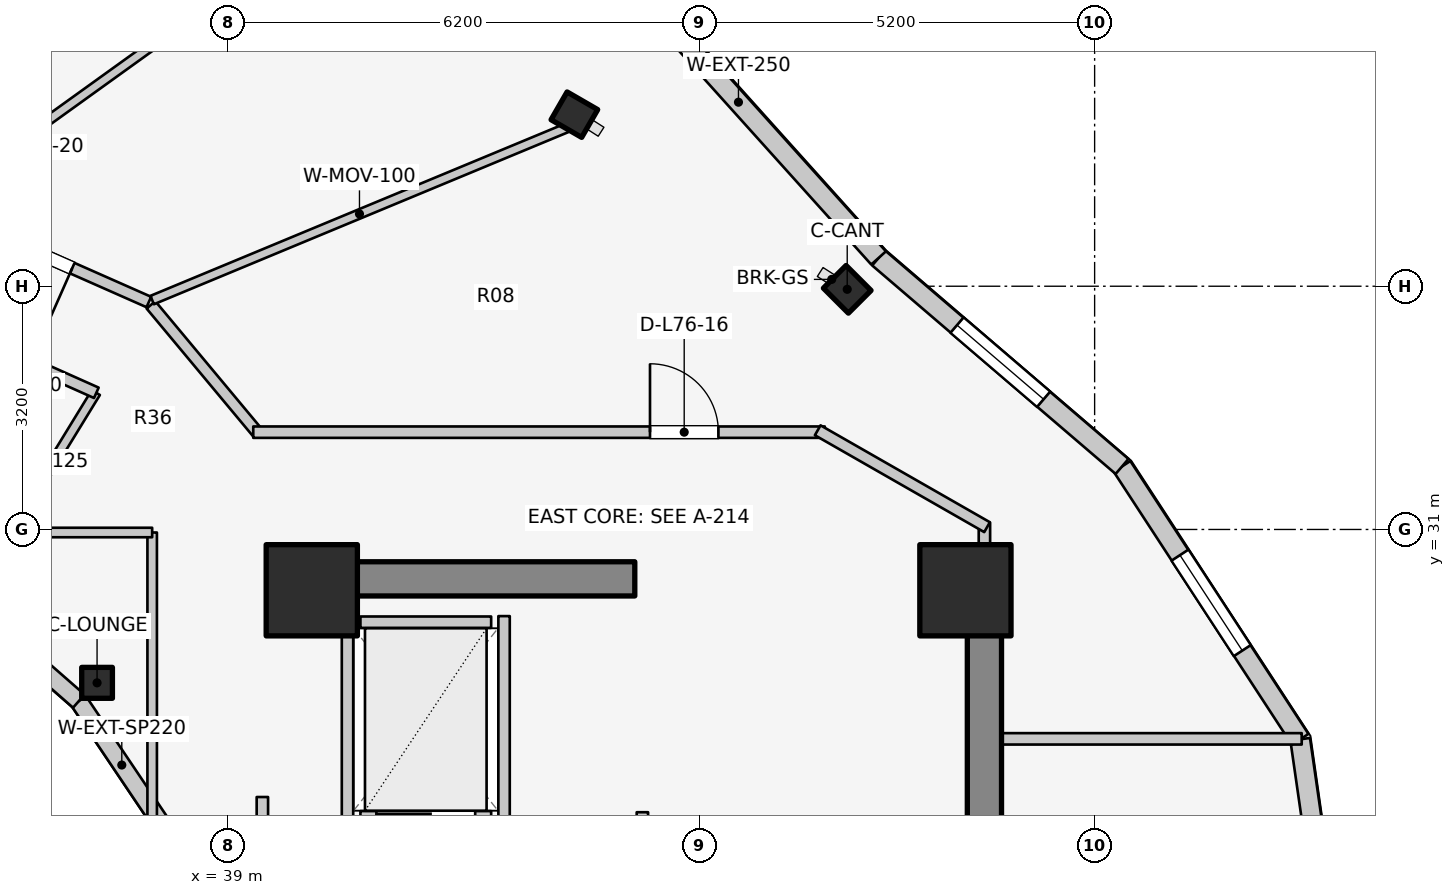
"""IFC4 building model, lengths in metres.
Left out: names, types, materials, properties, quantities, classifications, styles, units other than length and angle.
Written with IfcOpenShell. Run it as: python <this file> out.ifc"""

import sys

from ifc_helpers import new_model, si_unit, direction, frame, frame_2d, origin, origin_2d, place, context, subcontext, project, spatial, rectangle, i_section, extrude, element, fill, save


model = new_model("IFC4")
c1 = context("Model", 3, precision=1e-05, world=origin(), true_north=direction((0.0, 1.0)))
c2 = subcontext(c1, "Body", "Model", "MODEL_VIEW")
j1 = project(units=[si_unit("LENGTHUNIT", "METRE"), si_unit("PLANEANGLEUNIT", "RADIAN")], contexts=[c1])
p1 = place(None, origin())
s1 = spatial("IfcSite", under=j1, at=p1, CompositionType="ELEMENT")
p2 = place(p1, origin())
s2 = spatial("IfcBuilding", under=s1, at=p2, CompositionType="ELEMENT")
p3 = place(p2, frame((0.0, 0.0, 249.6)))
s3 = spatial("IfcBuildingStorey", under=s2, at=p3, CompositionType="ELEMENT", Elevation=249.6)
p4 = place(p3, frame((48.95, 17.05, 0.0), z_axis=(0.0, 0.0, 1.0), x_axis=(0.0, 1.0, 0.0)))
e1 = element("IfcWall", 1, at=p4, inside=s3, PredefinedType="SHEAR", context=c2, shape_type="SweptSolid", body=[
    extrude(rectangle(XDim=12.8, YDim=0.45, at=frame_2d((6.4, 0.0))), origin(), (0.0, 0.0, 1.0), 3.6),
])
p5 = place(p3, frame((39.85, 30.35, 0.0), z_axis=(0.0, 0.0, 1.0), x_axis=(1.0, 0.0, 0.0)))
e2 = element("IfcWall", 2, at=p5, inside=s3, PredefinedType="SHEAR", context=c2, shape_type="SweptSolid", body=[
    extrude(rectangle(XDim=4.5, YDim=0.45, at=frame_2d((2.25, 0.0))), origin(), (0.0, 0.0, 1.0), 3.6),
])
for number, where, z_axis, x_axis in (
    (3, (48.7, 30.2, 0.0), (0.0, 0.0, 1.0), (1.0, 0.0, 0.0)),
    (4, (40.1, 30.2, 0.0), (0.0, 0.0, 1.0), (1.0, 0.0, 0.0)),
):
    element("IfcColumn", number, at=place(p3, frame(where, z_axis=z_axis, x_axis=x_axis)), inside=s3, PredefinedType="COLUMN", context=c2, shape_type="SweptSolid", body=[
        extrude(rectangle(XDim=1.2, YDim=1.2, at=origin_2d()), origin(), (0.0, 0.0, 1.0), 3.6),
    ])
p6 = place(p3, frame((37.275, 28.982, 0.0), z_axis=(0.0, 0.0, 1.0), x_axis=(1.0, 0.0, 0.0)))
e5 = element("IfcColumn", 5, at=p6, inside=s3, PredefinedType="COLUMN", context=c2, shape_type="SweptSolid", body=[
    extrude(i_section(OverallWidth=0.404, OverallDepth=0.407, WebThickness=0.027, FlangeThickness=0.044, FilletRadius=0.025, at=origin_2d()), origin(), (0.0, 0.0, 1.0), 3.6),
])
for number, where, z_axis, x_axis in (
    (6, (47.145, 34.159, 0.0), (0.0, 0.0, 1.0), (0.707, 0.707, 0.0)),
    (7, (43.555, 36.457, 0.0), (0.0, 0.0, 1.0), (0.5, 0.866, 0.0)),
):
    element("IfcColumn", number, at=place(p3, frame(where, z_axis=z_axis, x_axis=x_axis)), inside=s3, PredefinedType="COLUMN", context=c2, shape_type="SweptSolid", body=[
        extrude(i_section(OverallWidth=0.422, OverallDepth=0.465, WebThickness=0.045, FlangeThickness=0.073, FilletRadius=0.025, at=origin_2d()), origin(), (0.0, 0.0, 1.0), 3.6),
    ])
p7 = place(p3, frame((38.166, 27.06, 0.0), z_axis=(0.0, 0.0, 1.0), x_axis=(-0.558197800898, 0.829707909492, 0.0)))
e8 = element("IfcWall", 8, at=p7, inside=s3, PredefinedType="STANDARD", context=c2, shape_type="SweptSolid", body=[
    extrude(rectangle(XDim=2.027, YDim=0.23, at=frame_2d((1.013, 0.0))), origin(), (0.0, 0.0, 1.0), 2.6),
])
p8 = place(p3, frame((37.035, 28.742, 0.0), z_axis=(0.0, 0.0, 1.0), x_axis=(-0.752576694707, 0.658504607869, 0.0)))
e9 = element("IfcWall", 9, at=p8, inside=s3, PredefinedType="STANDARD", context=c2, shape_type="SweptSolid", body=[
    extrude(rectangle(XDim=1.959, YDim=0.23, at=frame_2d((0.98, 0.0))), origin(), (0.0, 0.0, 1.0), 2.6),
])
p9 = place(p3, frame((53.86, 23.0, 0.0), z_axis=(0.0, 0.0, 1.0), x_axis=(-0.142712754019, 0.989764148593, 0.0)))
e10 = element("IfcWall", 10, at=p9, inside=s3, PredefinedType="STANDARD", context=c2, shape_type="SweptSolid", body=[
    extrude(rectangle(XDim=5.293, YDim=0.26, at=frame_2d((2.646, 0.0))), origin(), (0.0, 0.0, 1.0), 3.29),
])
p10 = place(p9, frame((1.896, 0.0, 0.75)))
e11 = element("IfcOpeningElement", 11, at=p10, cuts=e10, PredefinedType="OPENING", context=c2, shape_type="SweptSolid", body=[
    extrude(rectangle(XDim=1.5, YDim=1.6, at=frame_2d((0.75, 0.8))), frame((0.0, 0.14, 0.0), z_axis=(0.0, -1.0, 0.0), x_axis=(1.0, 0.0, 0.0)), (0.0, 0.0, 1.0), 0.28),
])
p11 = place(p3, frame((53.105, 28.239, 0.0), z_axis=(0.0, 0.0, 1.0), x_axis=(-0.546606419826, 0.837389647539, 0.0)))
e12 = element("IfcWall", 12, at=p11, inside=s3, PredefinedType="STANDARD", context=c2, shape_type="SweptSolid", body=[
    extrude(rectangle(XDim=4.288, YDim=0.26, at=frame_2d((2.144, 0.0))), origin(), (0.0, 0.0, 1.0), 3.29),
])
p12 = place(p11, frame((1.394, 0.0, 0.75)))
e13 = element("IfcOpeningElement", 13, at=p12, cuts=e12, PredefinedType="OPENING", context=c2, shape_type="SweptSolid", body=[
    extrude(rectangle(XDim=1.5, YDim=1.6, at=frame_2d((0.75, 0.8))), frame((0.0, 0.14, 0.0), z_axis=(0.0, -1.0, 0.0), x_axis=(1.0, 0.0, 0.0)), (0.0, 0.0, 1.0), 0.28),
])
p13 = place(p3, frame((50.761, 31.829, 0.0), z_axis=(0.0, 0.0, 1.0), x_axis=(-0.759587504333, 0.650405122413, 0.0)))
e14 = element("IfcWall", 14, at=p13, inside=s3, PredefinedType="STANDARD", context=c2, shape_type="SweptSolid", body=[
    extrude(rectangle(XDim=4.217, YDim=0.26, at=frame_2d((2.109, 0.0))), origin(), (0.0, 0.0, 1.0), 3.29),
])
p14 = place(p13, frame((1.359, 0.0, 0.75)))
e15 = element("IfcOpeningElement", 15, at=p14, cuts=e14, PredefinedType="OPENING", context=c2, shape_type="SweptSolid", body=[
    extrude(rectangle(XDim=1.5, YDim=1.6, at=frame_2d((0.75, 0.8))), frame((0.0, 0.14, 0.0), z_axis=(0.0, -1.0, 0.0), x_axis=(1.0, 0.0, 0.0)), (0.0, 0.0, 1.0), 0.28),
])
p15 = place(p3, frame((47.558, 34.572, 0.0), z_axis=(0.0, 0.0, 1.0), x_axis=(-0.668903560134, 0.743349196031, 0.0)))
e16 = element("IfcWall", 16, at=p15, inside=s3, PredefinedType="STANDARD", context=c2, shape_type="SweptSolid", body=[
    extrude(rectangle(XDim=5.513, YDim=0.26, at=frame_2d((2.756, 0.0))), origin(), (0.0, 0.0, 1.0), 3.29),
])
p16 = place(p3, frame((40.74, 27.22, 0.0), z_axis=(0.0, 0.0, 1.0), x_axis=(1.0, 0.0, 0.0)))
e17 = element("IfcWall", 17, at=p16, inside=s3, PredefinedType="SOLIDWALL", context=c2, shape_type="SweptSolid", body=[
    extrude(rectangle(XDim=1.72, YDim=0.15, at=frame_2d((0.86, 0.0))), origin(), (0.0, 0.0, 1.0), 3.295),
])
p17 = place(p16, frame((0.21, 0.0, 0.0)))
e18 = element("IfcOpeningElement", 18, at=p17, cuts=e17, PredefinedType="OPENING", context=c2, shape_type="SweptSolid", body=[
    extrude(rectangle(XDim=1.3, YDim=2.1, at=frame_2d((0.65, 1.05))), frame((0.0, 0.085, 0.0), z_axis=(0.0, -1.0, 0.0), x_axis=(1.0, 0.0, 0.0)), (0.0, 0.0, 1.0), 0.17),
])
p18 = place(p3, frame((40.74, 29.78, 0.0), z_axis=(0.0, 0.0, 1.0), x_axis=(1.0, 0.0, 0.0)))
e19 = element("IfcWall", 19, at=p18, inside=s3, PredefinedType="SOLIDWALL", context=c2, shape_type="SweptSolid", body=[
    extrude(rectangle(XDim=1.72, YDim=0.15, at=frame_2d((0.86, 0.0))), origin(), (0.0, 0.0, 1.0), 3.295),
])
for number, where, z_axis, x_axis in (
    (20, (40.57, 27.14, 0.0), (0.0, 0.0, 1.0), (0.0, 1.0, 0.0)),
    (21, (42.63, 27.14, 0.0), (0.0, 0.0, 1.0), (0.0, 1.0, 0.0)),
):
    element("IfcWall", number, at=place(p3, frame(where, z_axis=z_axis, x_axis=x_axis)), inside=s3, PredefinedType="SOLIDWALL", context=c2, shape_type="SweptSolid", body=[
        extrude(rectangle(XDim=2.72, YDim=0.15, at=frame_2d((1.36, 0.0))), origin(), (0.0, 0.0, 1.0), 3.295),
    ])
p19 = place(p3, frame((44.45, 24.08, 0.0), z_axis=(0.0, 0.0, 1.0), x_axis=(0.0, 1.0, 0.0)))
e22 = element("IfcWall", 22, at=p19, inside=s3, PredefinedType="PARTITIONING", context=c2, shape_type="SweptSolid", body=[
    extrude(rectangle(XDim=3.2, YDim=0.15, at=frame_2d((1.6, 0.0))), origin(), (0.0, 0.0, 1.0), 3.295),
])
p20 = place(p3, frame((39.45, 24.08, 0.0), z_axis=(0.0, 0.0, 1.0), x_axis=(0.0, 1.0, 0.0)))
e23 = element("IfcWall", 23, at=p20, inside=s3, PredefinedType="PARTITIONING", context=c2, shape_type="SweptSolid", body=[
    extrude(rectangle(XDim=3.4, YDim=0.15, at=frame_2d((1.7, 0.0))), origin(), (0.0, 0.0, 1.0), 3.295),
])
p21 = place(p20, frame((1.894, 0.0, 0.0)))
e24 = element("IfcOpeningElement", 24, at=p21, cuts=e23, PredefinedType="OPENING", context=c2, shape_type="SweptSolid", body=[
    extrude(rectangle(XDim=1.1, YDim=2.1, at=frame_2d((0.55, 1.05))), frame((0.0, 0.085, 0.0), z_axis=(0.0, -1.0, 0.0), x_axis=(1.0, 0.0, 0.0)), (0.0, 0.0, 1.0), 0.17),
])
p22 = place(p3, frame((35.55, 30.015, 0.0), z_axis=(0.0, 0.0, 1.0), x_axis=(0.522763432117, 0.852477796802, 0.0)))
e25 = element("IfcWall", 25, at=p22, inside=s3, PredefinedType="PARTITIONING", context=c2, shape_type="SweptSolid", body=[
    extrude(rectangle(XDim=3.269, YDim=0.125, at=frame_2d((1.635, 0.0))), origin(), (0.0, 0.0, 1.0), 2.672),
])
p23 = place(p3, frame((37.265, 32.798, 0.0), z_axis=(0.0, 0.0, 1.0), x_axis=(-0.913254317828, 0.407389924971, 0.0)))
e26 = element("IfcWall", 26, at=p23, inside=s3, PredefinedType="PARTITIONING", context=c2, shape_type="SweptSolid", body=[
    extrude(rectangle(XDim=2.787, YDim=0.15, at=frame_2d((1.393, 0.0))), origin(), (0.0, 0.0, 1.0), 2.823),
])
p24 = place(p3, frame((38.0, 25.8, 0.0), z_axis=(0.0, 0.0, 1.0), x_axis=(0.0, 1.0, 0.0)))
e27 = element("IfcWall", 27, at=p24, inside=s3, PredefinedType="PARTITIONING", context=c2, shape_type="SweptSolid", body=[
    extrude(rectangle(XDim=5.16, YDim=0.125, at=frame_2d((2.58, 0.0))), origin(), (0.0, 0.0, 1.0), 2.672),
])
p25 = place(p3, frame((35.4, 30.96, 0.0), z_axis=(0.0, 0.0, 1.0), x_axis=(1.0, 0.0, 0.0)))
e28 = element("IfcWall", 28, at=p25, inside=s3, PredefinedType="PARTITIONING", context=c2, shape_type="SweptSolid", body=[
    extrude(rectangle(XDim=2.6, YDim=0.125, at=frame_2d((1.3, 0.0))), origin(), (0.0, 0.0, 1.0), 2.816),
])
p26 = place(p3, frame((48.95, 28.245, 0.0), z_axis=(0.0, 0.0, 1.0), x_axis=(1.0, 0.0, 0.0)))
e29 = element("IfcWall", 29, at=p26, inside=s3, PredefinedType="PARTITIONING", context=c2, shape_type="SweptSolid", body=[
    extrude(rectangle(XDim=4.175, YDim=0.15, at=frame_2d((2.087, 0.0))), origin(), (0.0, 0.0, 1.0), 3.295),
])
p27 = place(p3, frame((48.95, 29.8, 0.0), z_axis=(0.0, 0.0, 1.0), x_axis=(0.0, 1.0, 0.0)))
e30 = element("IfcWall", 30, at=p27, inside=s3, PredefinedType="PARTITIONING", context=c2, shape_type="SweptSolid", body=[
    extrude(rectangle(XDim=1.29, YDim=0.15, at=frame_2d((0.645, 0.0))), origin(), (0.0, 0.0, 1.0), 3.295),
])
p28 = place(p3, frame((37.984, 33.955, 0.0), z_axis=(0.0, 0.0, 1.0), x_axis=(0.64030392053, -0.76812166312, 0.0)))
e31 = element("IfcWall", 31, at=p28, inside=s3, PredefinedType="PARTITIONING", context=c2, shape_type="SweptSolid", body=[
    extrude(rectangle(XDim=2.21, YDim=0.15, at=frame_2d((1.105, 0.0))), origin(), (0.0, 0.0, 1.0), 2.816),
])
p29 = place(p3, frame((39.33, 32.28, 0.0), z_axis=(0.0, 0.0, 1.0), x_axis=(1.0, 0.0, 0.0)))
e32 = element("IfcWall", 32, at=p29, inside=s3, PredefinedType="PARTITIONING", context=c2, shape_type="SweptSolid", body=[
    extrude(rectangle(XDim=7.52, YDim=0.15, at=frame_2d((3.76, 0.0))), origin(), (0.0, 0.0, 1.0), 2.816),
])
p30 = place(p29, frame((5.22, 0.0, 0.0)))
e33 = element("IfcOpeningElement", 33, at=p30, cuts=e32, PredefinedType="OPENING", context=c2, shape_type="SweptSolid", body=[
    extrude(rectangle(XDim=0.9, YDim=2.1, at=frame_2d((0.45, 1.05))), frame((0.0, 0.085, 0.0), z_axis=(0.0, -1.0, 0.0), x_axis=(1.0, 0.0, 0.0)), (0.0, 0.0, 1.0), 0.17),
])
p31 = place(p3, frame((46.757, 32.305, 0.0), z_axis=(0.0, 0.0, 1.0), x_axis=(0.867991349648, -0.496579315857, 0.0)))
e34 = element("IfcWall", 34, at=p31, inside=s3, PredefinedType="PARTITIONING", context=c2, shape_type="SweptSolid", body=[
    extrude(rectangle(XDim=2.567, YDim=0.15, at=frame_2d((1.283, 0.0))), origin(), (0.0, 0.0, 1.0), 2.66),
])
p32 = place(p3, frame((38.0, 34.018, 0.0), z_axis=(0.0, 0.0, 1.0), x_axis=(0.92349333748, 0.383614462228, 0.0)))
e35 = element("IfcWall", 35, at=p32, inside=s3, PredefinedType="MOVABLE", context=c2, shape_type="SweptSolid", body=[
    extrude(rectangle(XDim=5.907, YDim=0.12, at=frame_2d((2.954, 0.0))), origin(), (0.0, 0.0, 1.0), 2.66),
])
p33 = place(p3, frame((35.124, 35.297, 0.0), z_axis=(0.0, 0.0, 1.0), x_axis=(0.811745719064, 0.584011033783, 0.0)))
e36 = element("IfcWall", 36, at=p33, inside=s3, PredefinedType="MOVABLE", context=c2, shape_type="SweptSolid", body=[
    extrude(rectangle(XDim=4.534, YDim=0.12, at=frame_2d((2.267, 0.0))), origin(), (0.0, 0.0, 1.0), 2.66),
])
p34 = place(p3, frame((37.956, 33.992, 0.0), z_axis=(0.0, 0.0, 1.0), x_axis=(-0.914642679993, 0.404263240891, 0.0)))
e37 = element("IfcWall", 37, at=p34, inside=s3, PredefinedType="PARTITIONING", context=c2, shape_type="SweptSolid", body=[
    extrude(rectangle(XDim=3.154, YDim=0.15, at=frame_2d((1.577, 0.0))), origin(), (0.0, 0.0, 1.0), 2.823),
])
p35 = place(p34, frame((1.102, 0.0, 0.0)))
e38 = element("IfcOpeningElement", 38, at=p35, cuts=e37, PredefinedType="OPENING", context=c2, shape_type="SweptSolid", body=[
    extrude(rectangle(XDim=0.95, YDim=2.1, at=frame_2d((0.475, 1.05))), frame((0.0, 0.085, 0.0), z_axis=(0.0, -1.0, 0.0), x_axis=(1.0, 0.0, 0.0)), (0.0, 0.0, 1.0), 0.17),
])
p36 = place(p12, origin())
e39 = element("IfcWindow", 39, at=p36, inside=s3, PartitioningType="SINGLE_PANEL", PredefinedType="WINDOW", context=c2, shape_type="SweptSolid", body=[
    extrude(rectangle(XDim=1.5, YDim=1.6, at=frame_2d((0.75, 0.8))), frame((0.0, 0.03, 0.0), z_axis=(0.0, -1.0, 0.0), x_axis=(1.0, 0.0, 0.0)), (0.0, 0.0, 1.0), 0.06),
])
fill(e13, e39)
p37 = place(p14, origin())
e40 = element("IfcWindow", 40, at=p37, inside=s3, PartitioningType="SINGLE_PANEL", PredefinedType="WINDOW", context=c2, shape_type="SweptSolid", body=[
    extrude(rectangle(XDim=1.5, YDim=1.6, at=frame_2d((0.75, 0.8))), frame((0.0, 0.03, 0.0), z_axis=(0.0, -1.0, 0.0), x_axis=(1.0, 0.0, 0.0)), (0.0, 0.0, 1.0), 0.06),
])
fill(e15, e40)
p38 = place(p30, origin())
e41 = element("IfcDoor", 41, at=p38, inside=s3, OperationType="SINGLE_SWING_LEFT", PredefinedType="DOOR", context=c2, shape_type="SweptSolid", body=[
    extrude(rectangle(XDim=0.9, YDim=2.1, at=frame_2d((0.45, 1.05))), frame((0.0, 0.025, 0.0), z_axis=(0.0, -1.0, 0.0), x_axis=(1.0, 0.0, 0.0)), (0.0, 0.0, 1.0), 0.05),
])
fill(e33, e41)
p39 = place(p35, origin())
e42 = element("IfcDoor", 42, at=p39, inside=s3, OperationType="SINGLE_SWING_LEFT", PredefinedType="DOOR", context=c2, shape_type="SweptSolid", body=[
    extrude(rectangle(XDim=0.95, YDim=2.1, at=frame_2d((0.475, 1.05))), frame((0.0, 0.025, 0.0), z_axis=(0.0, -1.0, 0.0), x_axis=(1.0, 0.0, 0.0)), (0.0, 0.0, 1.0), 0.05),
])
fill(e38, e42)
save(model, sys.argv[1])
